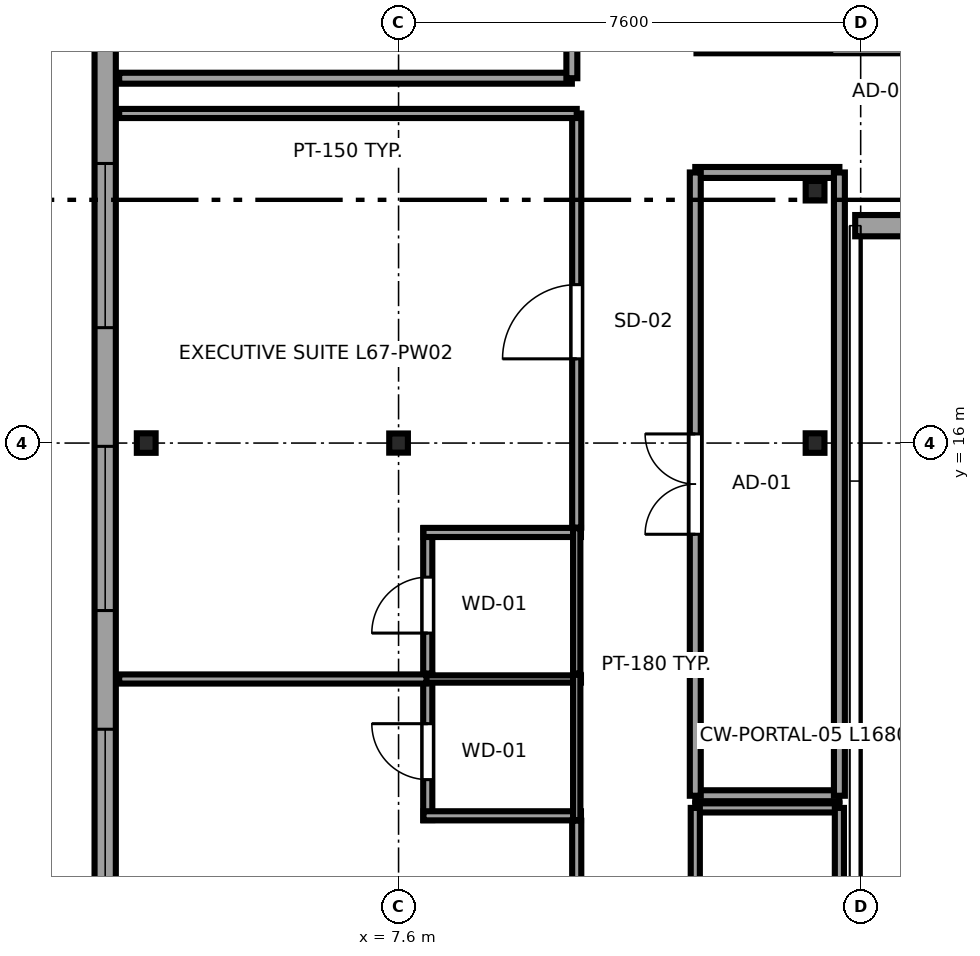
"""IFC4 building model, lengths in metres.
Left out: names, types, materials, properties, quantities, classifications, styles, units other than length and angle.
Written with IfcOpenShell. Run it as: python <this file> out.ifc"""

import sys

from ifc_helpers import new_model, si_unit, direction, frame, frame_2d, origin, origin_2d, place, context, subcontext, project, spatial, rectangle, i_section, extrude, source, transform, mapped, element, fill, save


model = new_model("IFC4")
c1 = context("Model", 3, precision=1e-05, world=origin(), true_north=direction((0.0, 1.0)))
c2 = subcontext(c1, "Body", "Model", "MODEL_VIEW")
j1 = project(units=[si_unit("LENGTHUNIT", "METRE"), si_unit("PLANEANGLEUNIT", "RADIAN")], contexts=[c1])
p1 = place(None, origin())
s1 = spatial("IfcSite", under=j1, at=p1, CompositionType="ELEMENT")
p2 = place(p1, origin())
s2 = spatial("IfcBuilding", under=s1, at=p2, CompositionType="ELEMENT")
p3 = place(p2, frame((0.0, 0.0, 252.3)))
s3 = spatial("IfcBuildingStorey", under=s2, at=p3, CompositionType="ELEMENT", Elevation=252.3)
m1 = source(origin(), c2, "Body", "SweptSolid", [
    extrude(i_section(OverallWidth=0.309, OverallDepth=0.321, WebThickness=0.014, FlangeThickness=0.022, FilletRadius=0.017, at=origin_2d()), origin(), (0.0, 0.0, 1.0), 3.55),
])
p4 = place(p3, frame((3.45, 16.0, 0.0), z_axis=(0.0, 0.0, 1.0), x_axis=(1.0, 0.0, 0.0)))
e1 = element("IfcColumn", 1, at=p4, inside=s3, PredefinedType="COLUMN", context=c2, shape_type="MappedRepresentation", body=[
    mapped(m1, transform((0.0, 0.0, 0.0), x_axis=(1.0, 0.0, 0.0), y_axis=(0.0, 1.0, 0.0), z_axis=(0.0, 0.0, 1.0), scale=1.0)),
])
m2 = source(origin(), c2, "Body", "SweptSolid", [
    extrude(i_section(OverallWidth=0.307, OverallDepth=0.315, WebThickness=0.012, FlangeThickness=0.019, FilletRadius=0.017, at=origin_2d()), origin(), (0.0, 0.0, 1.0), 3.55),
])
p5 = place(p3, frame((7.6, 16.0, 0.0), z_axis=(0.0, 0.0, 1.0), x_axis=(1.0, 0.0, 0.0)))
e2 = element("IfcColumn", 2, at=p5, inside=s3, PredefinedType="COLUMN", context=c2, shape_type="MappedRepresentation", body=[
    mapped(m2, transform((0.0, 0.0, 0.0), x_axis=(1.0, 0.0, 0.0), y_axis=(0.0, 1.0, 0.0), z_axis=(0.0, 0.0, 1.0), scale=1.0)),
])
for number, where, z_axis, x_axis in (
    (3, (14.45, 16.0, 0.0), (0.0, 0.0, 1.0), (1.0, 0.0, 0.0)),
    (4, (14.45, 20.15, 0.0), (0.0, 0.0, 1.0), (1.0, 0.0, 0.0)),
):
    element("IfcColumn", number, at=place(p3, frame(where, z_axis=z_axis, x_axis=x_axis)), inside=s3, PredefinedType="COLUMN", context=c2, shape_type="MappedRepresentation", body=[
        mapped(m1, transform((0.0, 0.0, 0.0), x_axis=(1.0, 0.0, 0.0), y_axis=(0.0, 1.0, 0.0), z_axis=(0.0, 0.0, 1.0), scale=1.0)),
    ])
p6 = place(p3, frame((15.11, 19.575, 0.0), z_axis=(0.0, 0.0, 1.0), x_axis=(1.0, 0.0, 0.0)))
e5 = element("IfcWall", 5, at=p6, inside=s3, PredefinedType="SOLIDWALL", context=c2, shape_type="SweptSolid", body=[
    extrude(rectangle(XDim=16.98, YDim=0.35, at=frame_2d((8.49, 0.0))), origin(), (0.0, 0.0, 1.0), 3.37),
])
p7 = place(p6, frame((1.88, 0.0, 0.68)))
e6 = element("IfcOpeningElement", 6, at=p7, cuts=e5, PredefinedType="OPENING", context=c2, shape_type="SweptSolid", body=[
    extrude(rectangle(XDim=2.7, YDim=1.95, at=frame_2d((1.35, 0.975))), frame((0.0, 0.185, 0.0), z_axis=(0.0, -1.0, 0.0), x_axis=(1.0, 0.0, 0.0)), (0.0, 0.0, 1.0), 0.37),
])
p8 = place(p6, frame((7.14, 0.0, 0.68)))
e7 = element("IfcOpeningElement", 7, at=p8, cuts=e5, PredefinedType="OPENING", context=c2, shape_type="SweptSolid", body=[
    extrude(rectangle(XDim=2.7, YDim=1.95, at=frame_2d((1.35, 0.975))), frame((0.0, 0.185, 0.0), z_axis=(0.0, -1.0, 0.0), x_axis=(1.0, 0.0, 0.0)), (0.0, 0.0, 1.0), 0.37),
])
p9 = place(p6, frame((12.4, 0.0, 0.68)))
e8 = element("IfcOpeningElement", 8, at=p9, cuts=e5, PredefinedType="OPENING", context=c2, shape_type="SweptSolid", body=[
    extrude(rectangle(XDim=2.7, YDim=1.95, at=frame_2d((1.35, 0.975))), frame((0.0, 0.185, 0.0), z_axis=(0.0, -1.0, 0.0), x_axis=(1.0, 0.0, 0.0)), (0.0, 0.0, 1.0), 0.37),
])
p10 = place(p3, frame((2.775, 40.783, 0.0), z_axis=(0.0, 0.0, 1.0), x_axis=(0.0, -1.0, 0.0)))
e9 = element("IfcWall", 9, at=p10, inside=s3, PredefinedType="SOLIDWALL", context=c2, shape_type="SweptSolid", body=[
    extrude(rectangle(XDim=33.766, YDim=0.35, at=frame_2d((16.883, 0.0))), origin(), (0.0, 0.0, 1.0), 3.37),
])
p11 = place(p10, frame((5.678, 0.0, 0.68)))
e10 = element("IfcOpeningElement", 10, at=p11, cuts=e9, PredefinedType="OPENING", context=c2, shape_type="SweptSolid", body=[
    extrude(rectangle(XDim=2.7, YDim=1.95, at=frame_2d((1.35, 0.975))), frame((0.0, 0.185, 0.0), z_axis=(0.0, -1.0, 0.0), x_axis=(1.0, 0.0, 0.0)), (0.0, 0.0, 1.0), 0.37),
])
p12 = place(p10, frame((11.431, 0.0, 0.68)))
e11 = element("IfcOpeningElement", 11, at=p12, cuts=e9, PredefinedType="OPENING", context=c2, shape_type="SweptSolid", body=[
    extrude(rectangle(XDim=2.7, YDim=1.95, at=frame_2d((1.35, 0.975))), frame((0.0, 0.185, 0.0), z_axis=(0.0, -1.0, 0.0), x_axis=(1.0, 0.0, 0.0)), (0.0, 0.0, 1.0), 0.37),
])
p13 = place(p10, frame((15.533, 0.0, 0.68)))
e12 = element("IfcOpeningElement", 12, at=p13, cuts=e9, PredefinedType="OPENING", context=c2, shape_type="SweptSolid", body=[
    extrude(rectangle(XDim=2.7, YDim=1.95, at=frame_2d((1.35, 0.975))), frame((0.0, 0.185, 0.0), z_axis=(0.0, -1.0, 0.0), x_axis=(1.0, 0.0, 0.0)), (0.0, 0.0, 1.0), 0.37),
])
p14 = place(p10, frame((20.185, 0.0, 0.68)))
e13 = element("IfcOpeningElement", 13, at=p14, cuts=e9, PredefinedType="OPENING", context=c2, shape_type="SweptSolid", body=[
    extrude(rectangle(XDim=2.7, YDim=1.95, at=frame_2d((1.35, 0.975))), frame((0.0, 0.185, 0.0), z_axis=(0.0, -1.0, 0.0), x_axis=(1.0, 0.0, 0.0)), (0.0, 0.0, 1.0), 0.37),
])
p15 = place(p10, frame((24.837, 0.0, 0.68)))
e14 = element("IfcOpeningElement", 14, at=p15, cuts=e9, PredefinedType="OPENING", context=c2, shape_type="SweptSolid", body=[
    extrude(rectangle(XDim=2.7, YDim=1.95, at=frame_2d((1.35, 0.975))), frame((0.0, 0.185, 0.0), z_axis=(0.0, -1.0, 0.0), x_axis=(1.0, 0.0, 0.0)), (0.0, 0.0, 1.0), 0.37),
])
p16 = place(p10, frame((29.489, 0.0, 0.68)))
e15 = element("IfcOpeningElement", 15, at=p16, cuts=e9, PredefinedType="OPENING", context=c2, shape_type="SweptSolid", body=[
    extrude(rectangle(XDim=2.7, YDim=1.95, at=frame_2d((1.35, 0.975))), frame((0.0, 0.185, 0.0), z_axis=(0.0, -1.0, 0.0), x_axis=(1.0, 0.0, 0.0)), (0.0, 0.0, 1.0), 0.37),
])
p17 = place(p3, frame((8.08, 9.8, 0.0), z_axis=(0.0, 0.0, 1.0), x_axis=(0.0, 1.0, 0.0)))
e16 = element("IfcWall", 16, at=p17, inside=s3, PredefinedType="PARTITIONING", context=c2, shape_type="SweptSolid", body=[
    extrude(rectangle(XDim=2.39, YDim=0.15, at=frame_2d((1.195, 0.0))), origin(), (0.0, 0.0, 1.0), 3.37),
])
p18 = place(p17, frame((0.665, 0.0, 0.0)))
e17 = element("IfcOpeningElement", 17, at=p18, cuts=e16, PredefinedType="OPENING", context=c2, shape_type="SweptSolid", body=[
    extrude(rectangle(XDim=0.92, YDim=2.01, at=frame_2d((0.46, 1.005))), frame((0.0, 0.085, 0.0), z_axis=(0.0, -1.0, 0.0), x_axis=(1.0, 0.0, 0.0)), (0.0, 0.0, 1.0), 0.17),
])
p19 = place(p3, frame((8.01, 9.87, 0.0), z_axis=(0.0, 0.0, 1.0), x_axis=(1.0, 0.0, 0.0)))
e18 = element("IfcWall", 18, at=p19, inside=s3, PredefinedType="PARTITIONING", context=c2, shape_type="SweptSolid", body=[
    extrude(rectangle(XDim=2.59, YDim=0.15, at=frame_2d((1.295, 0.0))), origin(), (0.0, 0.0, 1.0), 3.37),
])
p20 = place(p3, frame((8.01, 12.12, 0.0), z_axis=(0.0, 0.0, 1.0), x_axis=(1.0, 0.0, 0.0)))
e19 = element("IfcWall", 19, at=p20, inside=s3, PredefinedType="PLUMBINGWALL", context=c2, shape_type="SweptSolid", body=[
    extrude(rectangle(XDim=2.59, YDim=0.12, at=frame_2d((1.295, 0.0))), origin(), (0.0, 0.0, 1.0), 3.37),
])
p21 = place(p3, frame((10.53, 9.8, 0.0), z_axis=(0.0, 0.0, 1.0), x_axis=(0.0, 1.0, 0.0)))
e20 = element("IfcWall", 20, at=p21, inside=s3, PredefinedType="PLUMBINGWALL", context=c2, shape_type="SweptSolid", body=[
    extrude(rectangle(XDim=2.39, YDim=0.12, at=frame_2d((1.195, 0.0))), origin(), (0.0, 0.0, 1.0), 3.37),
])
p22 = place(p3, frame((8.08, 12.21, 0.0), z_axis=(0.0, 0.0, 1.0), x_axis=(0.0, 1.0, 0.0)))
e21 = element("IfcWall", 21, at=p22, inside=s3, PredefinedType="PARTITIONING", context=c2, shape_type="SweptSolid", body=[
    extrude(rectangle(XDim=2.39, YDim=0.15, at=frame_2d((1.195, 0.0))), origin(), (0.0, 0.0, 1.0), 3.37),
])
p23 = place(p22, frame((0.665, 0.0, 0.0)))
e22 = element("IfcOpeningElement", 22, at=p23, cuts=e21, PredefinedType="OPENING", context=c2, shape_type="SweptSolid", body=[
    extrude(rectangle(XDim=0.92, YDim=2.01, at=frame_2d((0.46, 1.005))), frame((0.0, 0.085, 0.0), z_axis=(0.0, -1.0, 0.0), x_axis=(1.0, 0.0, 0.0)), (0.0, 0.0, 1.0), 0.17),
])
p24 = place(p3, frame((8.01, 14.53, 0.0), z_axis=(0.0, 0.0, 1.0), x_axis=(1.0, 0.0, 0.0)))
e23 = element("IfcWall", 23, at=p24, inside=s3, PredefinedType="PARTITIONING", context=c2, shape_type="SweptSolid", body=[
    extrude(rectangle(XDim=2.59, YDim=0.15, at=frame_2d((1.295, 0.0))), origin(), (0.0, 0.0, 1.0), 3.37),
])
p25 = place(p3, frame((10.53, 12.21, 0.0), z_axis=(0.0, 0.0, 1.0), x_axis=(0.0, 1.0, 0.0)))
e24 = element("IfcWall", 24, at=p25, inside=s3, PredefinedType="PLUMBINGWALL", context=c2, shape_type="SweptSolid", body=[
    extrude(rectangle(XDim=2.39, YDim=0.12, at=frame_2d((1.195, 0.0))), origin(), (0.0, 0.0, 1.0), 3.37),
])
p26 = place(p3, frame((10.53, 3.005, 0.0), z_axis=(0.0, 0.0, 1.0), x_axis=(0.0, 1.0, 0.0)))
e25 = element("IfcWall", 25, at=p26, inside=s3, PredefinedType="PARTITIONING", context=c2, shape_type="SweptSolid", body=[
    extrude(rectangle(XDim=6.785, YDim=0.15, at=frame_2d((3.393, 0.0))), origin(), (0.0, 0.0, 1.0), 3.37),
])
p27 = place(p26, frame((2.79, 0.0, 0.0)))
e26 = element("IfcOpeningElement", 26, at=p27, cuts=e25, PredefinedType="OPENING", context=c2, shape_type="SweptSolid", body=[
    extrude(rectangle(XDim=1.22, YDim=2.08, at=frame_2d((0.61, 1.04))), frame((0.0, 0.085, 0.0), z_axis=(0.0, -1.0, 0.0), x_axis=(1.0, 0.0, 0.0)), (0.0, 0.0, 1.0), 0.17),
])
p28 = place(p3, frame((3.005, 12.12, 0.0), z_axis=(0.0, 0.0, 1.0), x_axis=(1.0, 0.0, 0.0)))
e27 = element("IfcWall", 27, at=p28, inside=s3, PredefinedType="PARTITIONING", context=c2, shape_type="SweptSolid", body=[
    extrude(rectangle(XDim=5.055, YDim=0.15, at=frame_2d((2.528, 0.0))), origin(), (0.0, 0.0, 1.0), 3.37),
])
p29 = place(p3, frame((10.53, 14.61, 0.0), z_axis=(0.0, 0.0, 1.0), x_axis=(0.0, 1.0, 0.0)))
e28 = element("IfcWall", 28, at=p29, inside=s3, PredefinedType="PARTITIONING", context=c2, shape_type="SweptSolid", body=[
    extrude(rectangle(XDim=6.81, YDim=0.15, at=frame_2d((3.405, 0.0))), origin(), (0.0, 0.0, 1.0), 3.37),
])
p30 = place(p29, frame((2.775, 0.0, 0.0)))
e29 = element("IfcOpeningElement", 29, at=p30, cuts=e28, PredefinedType="OPENING", context=c2, shape_type="SweptSolid", body=[
    extrude(rectangle(XDim=1.22, YDim=2.08, at=frame_2d((0.61, 1.04))), frame((0.0, 0.085, 0.0), z_axis=(0.0, -1.0, 0.0), x_axis=(1.0, 0.0, 0.0)), (0.0, 0.0, 1.0), 0.17),
])
p31 = place(p3, frame((3.005, 21.42, 0.0), z_axis=(0.0, 0.0, 1.0), x_axis=(1.0, 0.0, 0.0)))
e30 = element("IfcWall", 30, at=p31, inside=s3, PredefinedType="PARTITIONING", context=c2, shape_type="SweptSolid", body=[
    extrude(rectangle(XDim=7.525, YDim=0.15, at=frame_2d((3.763, 0.0))), origin(), (0.0, 0.0, 1.0), 3.37),
])
for number, where, z_axis, x_axis in (
    (31, (12.48, 10.2, 0.0), (0.0, 0.0, 1.0), (1.0, 0.0, 0.0)),
    (32, (12.48, 20.45, 0.0), (0.0, 0.0, 1.0), (1.0, 0.0, 0.0)),
):
    element("IfcWall", number, at=place(p3, frame(where, z_axis=z_axis, x_axis=x_axis)), inside=s3, PredefinedType="PARTITIONING", context=c2, shape_type="SweptSolid", body=[
        extrude(rectangle(XDim=2.37, YDim=0.18, at=frame_2d((1.185, 0.0))), origin(), (0.0, 0.0, 1.0), 3.37),
    ])
p32 = place(p3, frame((12.48, 10.2, 0.0), z_axis=(0.0, 0.0, 1.0), x_axis=(0.0, 1.0, 0.0)))
e33 = element("IfcWall", 33, at=p32, inside=s3, PredefinedType="PARTITIONING", context=c2, shape_type="SweptSolid", body=[
    extrude(rectangle(XDim=10.25, YDim=0.18, at=frame_2d((5.125, 0.0))), origin(), (0.0, 0.0, 1.0), 3.37),
])
p33 = place(p32, frame((4.3, 0.0, 0.0)))
e34 = element("IfcOpeningElement", 34, at=p33, cuts=e33, PredefinedType="OPENING", context=c2, shape_type="SweptSolid", body=[
    extrude(rectangle(XDim=1.65, YDim=2.15, at=frame_2d((0.825, 1.075))), frame((0.0, 0.1, 0.0), z_axis=(0.0, -1.0, 0.0), x_axis=(1.0, 0.0, 0.0)), (0.0, 0.0, 1.0), 0.2),
])
p34 = place(p3, frame((14.85, 10.2, 0.0), z_axis=(0.0, 0.0, 1.0), x_axis=(0.0, 1.0, 0.0)))
e35 = element("IfcWall", 35, at=p34, inside=s3, PredefinedType="PARTITIONING", context=c2, shape_type="SweptSolid", body=[
    extrude(rectangle(XDim=10.25, YDim=0.18, at=frame_2d((5.125, 0.0))), origin(), (0.0, 0.0, 1.0), 3.37),
])
p35 = place(p3, frame((12.48, 10.0, 0.0), z_axis=(0.0, 0.0, 1.0), x_axis=(1.0, 0.0, 0.0)))
e36 = element("IfcWall", 36, at=p35, inside=s3, PredefinedType="PARTITIONING", context=c2, shape_type="SweptSolid", body=[
    extrude(rectangle(XDim=2.37, YDim=0.15, at=frame_2d((1.185, 0.0))), origin(), (0.0, 0.0, 1.0), 3.37),
])
p36 = place(p3, frame((12.48, 3.005, 0.0), z_axis=(0.0, 0.0, 1.0), x_axis=(0.0, 1.0, 0.0)))
e37 = element("IfcWall", 37, at=p36, inside=s3, PredefinedType="PARTITIONING", context=c2, shape_type="SweptSolid", body=[
    extrude(rectangle(XDim=6.995, YDim=0.15, at=frame_2d((3.498, 0.0))), origin(), (0.0, 0.0, 1.0), 3.37),
])
p37 = place(p36, frame((2.673, 0.0, 0.0)))
e38 = element("IfcOpeningElement", 38, at=p37, cuts=e37, PredefinedType="OPENING", context=c2, shape_type="SweptSolid", body=[
    extrude(rectangle(XDim=1.65, YDim=2.15, at=frame_2d((0.825, 1.075))), frame((0.0, 0.085, 0.0), z_axis=(0.0, -1.0, 0.0), x_axis=(1.0, 0.0, 0.0)), (0.0, 0.0, 1.0), 0.17),
])
p38 = place(p3, frame((14.85, 3.005, 0.0), z_axis=(0.0, 0.0, 1.0), x_axis=(0.0, 1.0, 0.0)))
e39 = element("IfcWall", 39, at=p38, inside=s3, PredefinedType="PARTITIONING", context=c2, shape_type="SweptSolid", body=[
    extrude(rectangle(XDim=6.995, YDim=0.15, at=frame_2d((3.498, 0.0))), origin(), (0.0, 0.0, 1.0), 3.37),
])
p39 = place(p3, frame((12.5, 22.5, 0.0), z_axis=(0.0, 0.0, 1.0), x_axis=(1.0, 0.0, 0.0)))
e40 = element("IfcWall", 40, at=p39, inside=s3, PredefinedType="PARTITIONING", context=c2, shape_type="SweptSolid", body=[
    extrude(rectangle(XDim=6.1, YDim=0.18, at=frame_2d((3.05, 0.0))), origin(), (0.0, 0.0, 1.0), 3.37),
])
p40 = place(p39, frame((2.225, 0.0, 0.0)))
e41 = element("IfcOpeningElement", 41, at=p40, cuts=e40, PredefinedType="OPENING", context=c2, shape_type="SweptSolid", body=[
    extrude(rectangle(XDim=1.65, YDim=2.15, at=frame_2d((0.825, 1.075))), frame((0.0, 0.1, 0.0), z_axis=(0.0, -1.0, 0.0), x_axis=(1.0, 0.0, 0.0)), (0.0, 0.0, 1.0), 0.2),
])
p41 = place(p3, frame((3.005, 22.0, 0.0), z_axis=(0.0, 0.0, 1.0), x_axis=(1.0, 0.0, 0.0)))
e42 = element("IfcWall", 42, at=p41, inside=s3, PredefinedType="PARTITIONING", context=c2, shape_type="SweptSolid", body=[
    extrude(rectangle(XDim=7.445, YDim=0.18, at=frame_2d((3.723, 0.0))), origin(), (0.0, 0.0, 1.0), 3.37),
])
p42 = place(p3, frame((10.45, 22.0, 0.0), z_axis=(0.0, 0.0, 1.0), x_axis=(0.0, 1.0, 0.0)))
e43 = element("IfcWall", 43, at=p42, inside=s3, PredefinedType="PARTITIONING", context=c2, shape_type="SweptSolid", body=[
    extrude(rectangle(XDim=4.3, YDim=0.18, at=frame_2d((2.15, 0.0))), origin(), (0.0, 0.0, 1.0), 3.37),
])
p43 = place(p42, frame((1.325, 0.0, 0.0)))
e44 = element("IfcOpeningElement", 44, at=p43, cuts=e43, PredefinedType="OPENING", context=c2, shape_type="SweptSolid", body=[
    extrude(rectangle(XDim=1.65, YDim=2.15, at=frame_2d((0.825, 1.075))), frame((0.0, 0.1, 0.0), z_axis=(0.0, -1.0, 0.0), x_axis=(1.0, 0.0, 0.0)), (0.0, 0.0, 1.0), 0.2),
])
m3 = source(origin(), c2, "Body", "SweptSolid", [
    extrude(rectangle(XDim=2.7, YDim=1.95, at=frame_2d((1.35, 0.975))), frame((0.0, 0.09, 0.0), z_axis=(0.0, -1.0, 0.0), x_axis=(1.0, 0.0, 0.0)), (0.0, 0.0, 1.0), 0.06),
])
p44 = place(p14, origin())
e45 = element("IfcWindow", 45, at=p44, inside=s3, PartitioningType="TRIPLE_PANEL_HORIZONTAL", PredefinedType="WINDOW", context=c2, shape_type="MappedRepresentation", body=[
    mapped(m3, transform((0.0, 0.0, 0.0), x_axis=(1.0, 0.0, 0.0), y_axis=(0.0, 1.0, 0.0), z_axis=(0.0, 0.0, 1.0), scale=1.0)),
])
fill(e13, e45)
p45 = place(p15, origin())
e46 = element("IfcWindow", 46, at=p45, inside=s3, PartitioningType="TRIPLE_PANEL_HORIZONTAL", PredefinedType="WINDOW", context=c2, shape_type="MappedRepresentation", body=[
    mapped(m3, transform((0.0, 0.0, 0.0), x_axis=(1.0, 0.0, 0.0), y_axis=(0.0, 1.0, 0.0), z_axis=(0.0, 0.0, 1.0), scale=1.0)),
])
fill(e14, e46)
p46 = place(p16, origin())
e47 = element("IfcWindow", 47, at=p46, inside=s3, PartitioningType="TRIPLE_PANEL_HORIZONTAL", PredefinedType="WINDOW", context=c2, shape_type="MappedRepresentation", body=[
    mapped(m3, transform((0.0, 0.0, 0.0), x_axis=(1.0, 0.0, 0.0), y_axis=(0.0, 1.0, 0.0), z_axis=(0.0, 0.0, 1.0), scale=1.0)),
])
fill(e15, e47)
m4 = source(origin(), c2, "Body", "SweptSolid", [
    extrude(rectangle(XDim=0.92, YDim=2.01, at=frame_2d((0.46, 1.005))), frame((0.0, 0.025, 0.0), z_axis=(0.0, -1.0, 0.0), x_axis=(1.0, 0.0, 0.0)), (0.0, 0.0, 1.0), 0.05),
])
p47 = place(p18, origin())
e48 = element("IfcDoor", 48, at=p47, inside=s3, OperationType="SINGLE_SWING_RIGHT", PredefinedType="DOOR", context=c2, shape_type="MappedRepresentation", body=[
    mapped(m4, transform((0.0, 0.0, 0.0), x_axis=(1.0, 0.0, 0.0), y_axis=(0.0, 1.0, 0.0), z_axis=(0.0, 0.0, 1.0), scale=1.0)),
])
fill(e17, e48)
p48 = place(p23, origin())
e49 = element("IfcDoor", 49, at=p48, inside=s3, OperationType="SINGLE_SWING_LEFT", PredefinedType="DOOR", context=c2, shape_type="MappedRepresentation", body=[
    mapped(m4, transform((0.0, 0.0, 0.0), x_axis=(1.0, 0.0, 0.0), y_axis=(0.0, 1.0, 0.0), z_axis=(0.0, 0.0, 1.0), scale=1.0)),
])
fill(e22, e49)
m5 = source(origin(), c2, "Body", "SweptSolid", [
    extrude(rectangle(XDim=1.22, YDim=2.08, at=frame_2d((0.61, 1.04))), frame((0.0, 0.025, 0.0), z_axis=(0.0, -1.0, 0.0), x_axis=(1.0, 0.0, 0.0)), (0.0, 0.0, 1.0), 0.05),
])
p49 = place(p30, origin())
e50 = element("IfcDoor", 50, at=p49, inside=s3, OperationType="SINGLE_SWING_LEFT", PredefinedType="DOOR", context=c2, shape_type="MappedRepresentation", body=[
    mapped(m5, transform((0.0, 0.0, 0.0), x_axis=(1.0, 0.0, 0.0), y_axis=(0.0, 1.0, 0.0), z_axis=(0.0, 0.0, 1.0), scale=1.0)),
])
fill(e29, e50)
m6 = source(origin(), c2, "Body", "SweptSolid", [
    extrude(rectangle(XDim=1.65, YDim=2.15, at=frame_2d((0.825, 1.075))), frame((0.0, 0.025, 0.0), z_axis=(0.0, -1.0, 0.0), x_axis=(1.0, 0.0, 0.0)), (0.0, 0.0, 1.0), 0.05),
])
p50 = place(p33, origin())
e51 = element("IfcDoor", 51, at=p50, inside=s3, OperationType="DOUBLE_DOOR_SINGLE_SWING", PredefinedType="DOOR", context=c2, shape_type="MappedRepresentation", body=[
    mapped(m6, transform((0.0, 0.0, 0.0), x_axis=(1.0, 0.0, 0.0), y_axis=(0.0, 1.0, 0.0), z_axis=(0.0, 0.0, 1.0), scale=1.0)),
])
fill(e34, e51)
save(model, sys.argv[1])
